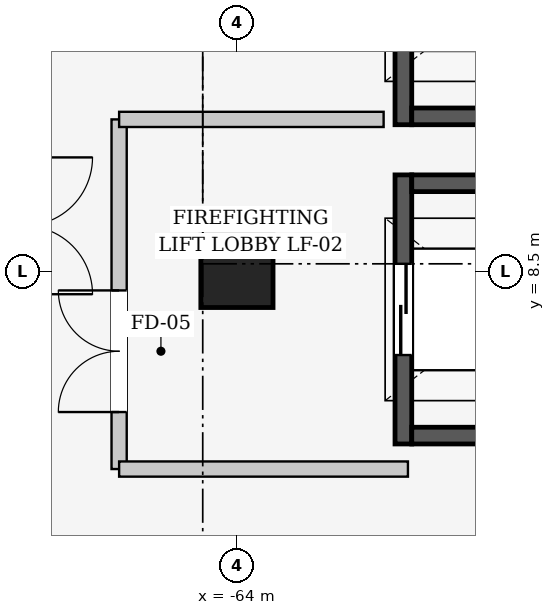
"""IFC4 building model, lengths in metres.
Left out: names, types, materials, properties, quantities, classifications, styles, units other than length and angle.
Written with IfcOpenShell. Run it as: python <this file> out.ifc"""

import sys

from ifc_helpers import new_model, si_unit, direction, frame, frame_2d, origin, origin_2d, place, context, subcontext, project, spatial, rectangle, extrude, element, fill, save


model = new_model("IFC4")
c1 = context("Model", 3, precision=1e-05, world=origin(), true_north=direction((0.0, 1.0)))
c2 = subcontext(c1, "Body", "Model", "MODEL_VIEW")
j1 = project(units=[si_unit("LENGTHUNIT", "METRE"), si_unit("PLANEANGLEUNIT", "RADIAN")], contexts=[c1])
p1 = place(None, origin())
s1 = spatial("IfcSite", under=j1, at=p1, CompositionType="ELEMENT")
p2 = place(p1, origin())
s2 = spatial("IfcBuilding", under=s1, at=p2, CompositionType="ELEMENT")
p3 = place(p2, origin())
s3 = spatial("IfcBuildingStorey", under=s2, at=p3, CompositionType="ELEMENT", Elevation=0.0)
p4 = place(p3, frame((-64.0, 8.5, 0.0), z_axis=(0.0, 0.0, 1.0), x_axis=(1.0, 0.0, 0.0)))
e1 = element("IfcColumn", 1, at=p4, inside=s3, PredefinedType="COLUMN", context=c2, shape_type="SweptSolid", body=[
    extrude(rectangle(XDim=0.95, YDim=0.95, at=origin_2d()), origin(), (0.0, 0.0, 1.0), 6.0),
])
p5 = place(p3, frame((-61.81, 6.23, 0.0), z_axis=(0.0, 0.0, 1.0), x_axis=(0.0, 1.0, 0.0)))
e2 = element("IfcWall", 2, at=p5, inside=s3, PredefinedType="SHEAR", context=c2, shape_type="SweptSolid", body=[
    extrude(rectangle(XDim=3.54, YDim=0.22, at=frame_2d((1.77, 0.0))), origin(), (0.0, 0.0, 1.0), 6.0),
])
p6 = place(p5, frame((1.17, 0.0, 0.0)))
e3 = element("IfcOpeningElement", 3, at=p6, cuts=e2, PredefinedType="OPENING", context=c2, shape_type="SweptSolid", body=[
    extrude(rectangle(XDim=1.2, YDim=2.2, at=frame_2d((0.6, 1.1))), frame((0.0, 0.12, 0.0), z_axis=(0.0, -1.0, 0.0), x_axis=(1.0, 0.0, 0.0)), (0.0, 0.0, 1.0), 0.24),
])
for number, where, z_axis, x_axis in (
    (4, (-61.7, 9.66, 0.0), (0.0, 0.0, 1.0), (1.0, 0.0, 0.0)),
    (5, (-59.3, 6.34, 0.0), (0.0, 0.0, 1.0), (-1.0, 0.0, 0.0)),
):
    element("IfcWall", number, at=place(p3, frame(where, z_axis=z_axis, x_axis=x_axis)), inside=s3, PredefinedType="SHEAR", context=c2, shape_type="SweptSolid", body=[
        extrude(rectangle(XDim=2.4, YDim=0.22, at=frame_2d((1.2, 0.0))), origin(), (0.0, 0.0, 1.0), 6.0),
    ])
p7 = place(p3, frame((-61.81, 10.43, 0.0), z_axis=(0.0, 0.0, 1.0), x_axis=(0.0, 1.0, 0.0)))
e6 = element("IfcWall", 6, at=p7, inside=s3, PredefinedType="SHEAR", context=c2, shape_type="SweptSolid", body=[
    extrude(rectangle(XDim=3.54, YDim=0.22, at=frame_2d((1.77, 0.0))), origin(), (0.0, 0.0, 1.0), 6.0),
])
p8 = place(p7, frame((1.22, 0.0, 0.0)))
e7 = element("IfcOpeningElement", 7, at=p8, cuts=e6, PredefinedType="OPENING", context=c2, shape_type="SweptSolid", body=[
    extrude(rectangle(XDim=1.1, YDim=2.2, at=frame_2d((0.55, 1.1))), frame((0.0, 0.12, 0.0), z_axis=(0.0, -1.0, 0.0), x_axis=(1.0, 0.0, 0.0)), (0.0, 0.0, 1.0), 0.24),
])
p9 = place(p3, frame((-59.3, 10.54, 0.0), z_axis=(0.0, 0.0, 1.0), x_axis=(-1.0, 0.0, 0.0)))
e8 = element("IfcWall", 8, at=p9, inside=s3, PredefinedType="SHEAR", context=c2, shape_type="SweptSolid", body=[
    extrude(rectangle(XDim=2.4, YDim=0.22, at=frame_2d((1.2, 0.0))), origin(), (0.0, 0.0, 1.0), 6.0),
])
p10 = place(p3, frame((-65.55, 5.9, 0.0), z_axis=(0.0, 0.0, 1.0), x_axis=(0.0, 1.0, 0.0)))
e9 = element("IfcWall", 9, at=p10, inside=s3, PredefinedType="PARTITIONING", context=c2, shape_type="SweptSolid", body=[
    extrude(rectangle(XDim=4.6, YDim=0.2, at=frame_2d((2.3, 0.0))), origin(), (0.0, 0.0, 1.0), 4.725),
])
p11 = place(p10, frame((0.75, 0.0, 0.0)))
e10 = element("IfcOpeningElement", 10, at=p11, cuts=e9, PredefinedType="OPENING", context=c2, shape_type="SweptSolid", body=[
    extrude(rectangle(XDim=1.6, YDim=2.2, at=frame_2d((0.8, 1.1))), frame((0.0, 0.11, 0.0), z_axis=(0.0, -1.0, 0.0), x_axis=(1.0, 0.0, 0.0)), (0.0, 0.0, 1.0), 0.22),
])
p12 = place(p3, frame((-65.55, 10.5, 0.0), z_axis=(0.0, 0.0, 1.0), x_axis=(1.0, 0.0, 0.0)))
e11 = element("IfcWall", 11, at=p12, inside=s3, PredefinedType="PARTITIONING", context=c2, shape_type="SweptSolid", body=[
    extrude(rectangle(XDim=3.48, YDim=0.2, at=frame_2d((1.74, 0.0))), origin(), (0.0, 0.0, 1.0), 5.025),
])
p13 = place(p3, frame((-61.75, 5.9, 0.0), z_axis=(0.0, 0.0, 1.0), x_axis=(-1.0, 0.0, 0.0)))
e12 = element("IfcWall", 12, at=p13, inside=s3, PredefinedType="PARTITIONING", context=c2, shape_type="SweptSolid", body=[
    extrude(rectangle(XDim=3.8, YDim=0.2, at=frame_2d((1.9, 0.0))), origin(), (0.0, 0.0, 1.0), 5.025),
])
p14 = place(p6, origin())
e13 = element("IfcDoor", 13, at=p14, inside=s3, OperationType="SLIDING_TO_LEFT", PredefinedType="DOOR", context=c2, shape_type="SweptSolid", body=[
    extrude(rectangle(XDim=1.2, YDim=2.2, at=frame_2d((0.6, 1.1))), frame((0.0, 0.025, 0.0), z_axis=(0.0, -1.0, 0.0), x_axis=(1.0, 0.0, 0.0)), (0.0, 0.0, 1.0), 0.05),
])
fill(e3, e13)
p15 = place(p11, origin())
e14 = element("IfcDoor", 14, at=p15, inside=s3, OperationType="DOUBLE_DOOR_SINGLE_SWING", PredefinedType="DOOR", context=c2, shape_type="SweptSolid", body=[
    extrude(rectangle(XDim=1.6, YDim=2.2, at=frame_2d((0.8, 1.1))), frame((0.0, 0.025, 0.0), z_axis=(0.0, -1.0, 0.0), x_axis=(1.0, 0.0, 0.0)), (0.0, 0.0, 1.0), 0.05),
])
fill(e10, e14)
save(model, sys.argv[1])
